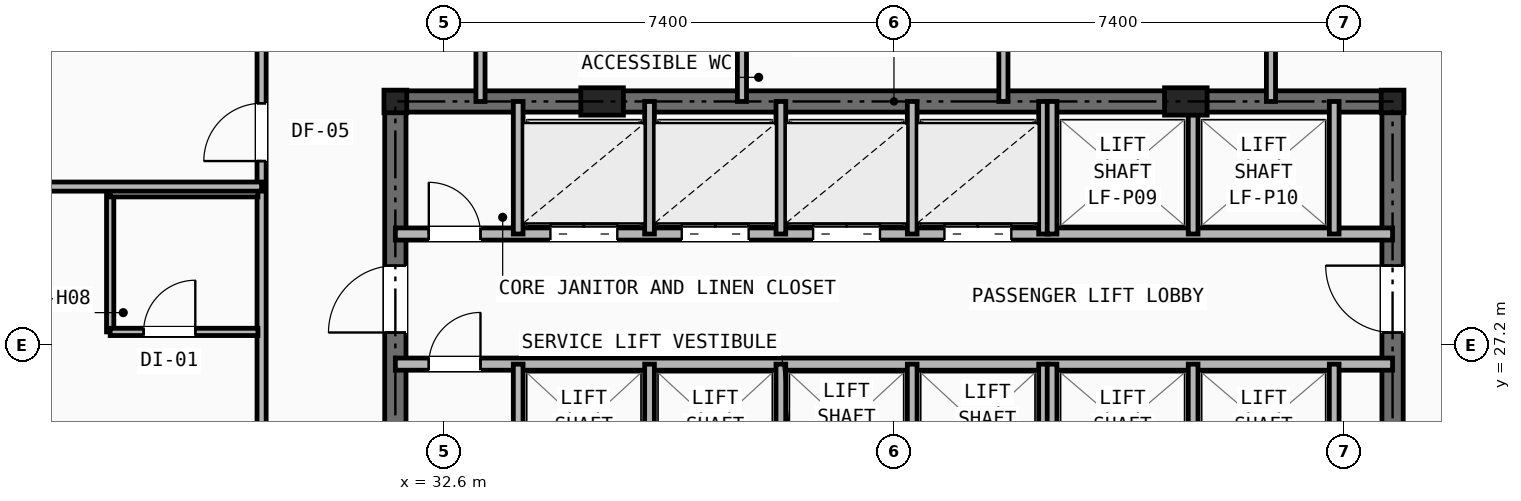
"""IFC4 building model, lengths in metres.
Left out: names, types, materials, properties, quantities, classifications, styles, units other than length and angle.
Written with IfcOpenShell. Run it as: python <this file> out.ifc"""

import sys

from ifc_helpers import new_model, si_unit, direction, frame, frame_2d, origin, origin_2d, place, context, subcontext, project, spatial, rectangle, i_section, extrude, element, fill, save


model = new_model("IFC4")
c1 = context("Model", 3, precision=1e-05, world=origin(), true_north=direction((0.0, 1.0)))
c2 = subcontext(c1, "Body", "Model", "MODEL_VIEW")
j1 = project(units=[si_unit("LENGTHUNIT", "METRE"), si_unit("PLANEANGLEUNIT", "RADIAN")], contexts=[c1])
p1 = place(None, origin())
s1 = spatial("IfcSite", under=j1, at=p1, CompositionType="ELEMENT")
p2 = place(p1, origin())
s2 = spatial("IfcBuilding", under=s1, at=p2, CompositionType="ELEMENT")
p3 = place(p2, frame((0.0, 0.0, 49.6)))
s3 = spatial("IfcBuildingStorey", under=s2, at=p3, CompositionType="ELEMENT", Elevation=49.6)
for number, where, z_axis, x_axis in (
    (1, (31.8, 31.2, 0.0), (0.0, 0.0, 1.0), (1.0, 0.0, 0.0)),
    (2, (48.2, 31.2, 0.0), (0.0, 0.0, 1.0), (1.0, 0.0, 0.0)),
):
    element("IfcColumn", number, at=place(p3, frame(where, z_axis=z_axis, x_axis=x_axis)), inside=s3, PredefinedType="COLUMN", context=c2, shape_type="SweptSolid", body=[
        extrude(i_section(OverallWidth=0.374, OverallDepth=0.372, WebThickness=0.016, FlangeThickness=0.026, at=origin_2d()), origin(), (0.0, 0.0, 1.0), 3.2),
    ])
for number, where, z_axis, x_axis in (
    (3, (35.2, 31.2, 0.0), (0.0, 0.0, 1.0), (1.0, 0.0, 0.0)),
    (4, (44.8, 31.2, 0.0), (0.0, 0.0, 1.0), (1.0, 0.0, 0.0)),
):
    element("IfcColumn", number, at=place(p3, frame(where, z_axis=z_axis, x_axis=x_axis)), inside=s3, PredefinedType="PILASTER", context=c2, shape_type="SweptSolid", body=[
        extrude(rectangle(XDim=0.7, YDim=0.45, at=origin_2d()), origin(), (0.0, 0.0, 1.0), 3.2),
    ])
p4 = place(p3, frame((31.8, 31.2, 0.0), z_axis=(0.0, 0.0, 1.0), x_axis=(1.0, 0.0, 0.0)))
e5 = element("IfcWall", 5, at=p4, inside=s3, PredefinedType="SHEAR", context=c2, shape_type="SweptSolid", body=[
    extrude(rectangle(XDim=16.4, YDim=0.35, at=frame_2d((8.2, 0.0))), origin(), (0.0, 0.0, 1.0), 2.98),
])
p5 = place(p3, frame((31.8, 16.4, 0.0), z_axis=(0.0, 0.0, 1.0), x_axis=(0.0, 1.0, 0.0)))
e6 = element("IfcWall", 6, at=p5, inside=s3, PredefinedType="SHEAR", context=c2, shape_type="SweptSolid", body=[
    extrude(rectangle(XDim=14.8, YDim=0.35, at=frame_2d((7.4, 0.0))), origin(), (0.0, 0.0, 1.0), 2.98),
])
p6 = place(p5, frame((11.0, 0.0, 0.0)))
e7 = element("IfcOpeningElement", 7, at=p6, cuts=e6, PredefinedType="OPENING", context=c2, shape_type="SweptSolid", body=[
    extrude(rectangle(XDim=1.1, YDim=2.15, at=frame_2d((0.55, 1.075))), frame((0.0, 0.185, 0.0), z_axis=(0.0, -1.0, 0.0), x_axis=(1.0, 0.0, 0.0)), (0.0, 0.0, 1.0), 0.37),
])
p7 = place(p3, frame((48.2, 16.4, 0.0), z_axis=(0.0, 0.0, 1.0), x_axis=(0.0, 1.0, 0.0)))
e8 = element("IfcWall", 8, at=p7, inside=s3, PredefinedType="SHEAR", context=c2, shape_type="SweptSolid", body=[
    extrude(rectangle(XDim=14.8, YDim=0.35, at=frame_2d((7.4, 0.0))), origin(), (0.0, 0.0, 1.0), 2.98),
])
p8 = place(p7, frame((11.0, 0.0, 0.0)))
e9 = element("IfcOpeningElement", 9, at=p8, cuts=e8, PredefinedType="OPENING", context=c2, shape_type="SweptSolid", body=[
    extrude(rectangle(XDim=1.1, YDim=2.15, at=frame_2d((0.55, 1.075))), frame((0.0, 0.185, 0.0), z_axis=(0.0, -1.0, 0.0), x_axis=(1.0, 0.0, 0.0)), (0.0, 0.0, 1.0), 0.37),
])
p9 = place(p3, frame((31.8, 29.02, 0.0), z_axis=(0.0, 0.0, 1.0), x_axis=(1.0, 0.0, 0.0)))
e10 = element("IfcWall", 10, at=p9, inside=s3, PredefinedType="SOLIDWALL", context=c2, shape_type="SweptSolid", body=[
    extrude(rectangle(XDim=16.4, YDim=0.2, at=frame_2d((8.2, 0.0))), origin(), (0.0, 0.0, 1.0), 2.431),
])
p10 = place(p9, frame((0.55, 0.0, 0.0)))
e11 = element("IfcOpeningElement", 11, at=p10, cuts=e10, PredefinedType="OPENING", context=c2, shape_type="SweptSolid", body=[
    extrude(rectangle(XDim=0.85, YDim=2.05, at=frame_2d((0.425, 1.025))), frame((0.0, 0.11, 0.0), z_axis=(0.0, -1.0, 0.0), x_axis=(1.0, 0.0, 0.0)), (0.0, 0.0, 1.0), 0.22),
])
p11 = place(p9, frame((2.55, 0.0, 0.0)))
e12 = element("IfcOpeningElement", 12, at=p11, cuts=e10, PredefinedType="OPENING", context=c2, shape_type="SweptSolid", body=[
    extrude(rectangle(XDim=1.1, YDim=2.15, at=frame_2d((0.55, 1.075))), frame((0.0, 0.11, 0.0), z_axis=(0.0, -1.0, 0.0), x_axis=(1.0, 0.0, 0.0)), (0.0, 0.0, 1.0), 0.22),
])
p12 = place(p9, frame((4.71, 0.0, 0.0)))
e13 = element("IfcOpeningElement", 13, at=p12, cuts=e10, PredefinedType="OPENING", context=c2, shape_type="SweptSolid", body=[
    extrude(rectangle(XDim=1.1, YDim=2.15, at=frame_2d((0.55, 1.075))), frame((0.0, 0.11, 0.0), z_axis=(0.0, -1.0, 0.0), x_axis=(1.0, 0.0, 0.0)), (0.0, 0.0, 1.0), 0.22),
])
p13 = place(p9, frame((6.87, 0.0, 0.0)))
e14 = element("IfcOpeningElement", 14, at=p13, cuts=e10, PredefinedType="OPENING", context=c2, shape_type="SweptSolid", body=[
    extrude(rectangle(XDim=1.1, YDim=2.15, at=frame_2d((0.55, 1.075))), frame((0.0, 0.11, 0.0), z_axis=(0.0, -1.0, 0.0), x_axis=(1.0, 0.0, 0.0)), (0.0, 0.0, 1.0), 0.22),
])
p14 = place(p9, frame((9.03, 0.0, 0.0)))
e15 = element("IfcOpeningElement", 15, at=p14, cuts=e10, PredefinedType="OPENING", context=c2, shape_type="SweptSolid", body=[
    extrude(rectangle(XDim=1.1, YDim=2.15, at=frame_2d((0.55, 1.075))), frame((0.0, 0.11, 0.0), z_axis=(0.0, -1.0, 0.0), x_axis=(1.0, 0.0, 0.0)), (0.0, 0.0, 1.0), 0.22),
])
p15 = place(p3, frame((31.8, 26.88, 0.0), z_axis=(0.0, 0.0, 1.0), x_axis=(1.0, 0.0, 0.0)))
e16 = element("IfcWall", 16, at=p15, inside=s3, PredefinedType="SOLIDWALL", context=c2, shape_type="SweptSolid", body=[
    extrude(rectangle(XDim=16.4, YDim=0.2, at=frame_2d((8.2, 0.0))), origin(), (0.0, 0.0, 1.0), 2.431),
])
p16 = place(p15, frame((0.55, 0.0, 0.0)))
e17 = element("IfcOpeningElement", 17, at=p16, cuts=e16, PredefinedType="OPENING", context=c2, shape_type="SweptSolid", body=[
    extrude(rectangle(XDim=0.85, YDim=2.05, at=frame_2d((0.425, 1.025))), frame((0.0, 0.11, 0.0), z_axis=(0.0, -1.0, 0.0), x_axis=(1.0, 0.0, 0.0)), (0.0, 0.0, 1.0), 0.22),
])
p17 = place(p3, frame((33.82, 29.02, 0.0), z_axis=(0.0, 0.0, 1.0), x_axis=(0.0, 1.0, 0.0)))
e18 = element("IfcWall", 18, at=p17, inside=s3, PredefinedType="SOLIDWALL", context=c2, shape_type="SweptSolid", body=[
    extrude(rectangle(XDim=2.18, YDim=0.16, at=frame_2d((1.09, 0.0))), origin(), (0.0, 0.0, 1.0), 2.431),
])
p18 = place(p3, frame((33.82, 24.8, 0.0), z_axis=(0.0, 0.0, 1.0), x_axis=(0.0, 1.0, 0.0)))
e19 = element("IfcWall", 19, at=p18, inside=s3, PredefinedType="SOLIDWALL", context=c2, shape_type="SweptSolid", body=[
    extrude(rectangle(XDim=2.08, YDim=0.16, at=frame_2d((1.04, 0.0))), origin(), (0.0, 0.0, 1.0), 2.98),
])
for number, where, z_axis, x_axis in (
    (20, (35.98, 29.02, 0.0), (0.0, 0.0, 1.0), (0.0, 1.0, 0.0)),
    (21, (38.14, 29.02, 0.0), (0.0, 0.0, 1.0), (0.0, 1.0, 0.0)),
    (22, (40.3, 29.02, 0.0), (0.0, 0.0, 1.0), (0.0, 1.0, 0.0)),
    (23, (42.46, 29.02, 0.0), (0.0, 0.0, 1.0), (0.0, 1.0, 0.0)),
):
    element("IfcWall", number, at=place(p3, frame(where, z_axis=z_axis, x_axis=x_axis)), inside=s3, PredefinedType="SOLIDWALL", context=c2, shape_type="SweptSolid", body=[
        extrude(rectangle(XDim=2.18, YDim=0.16, at=frame_2d((1.09, 0.0))), origin(), (0.0, 0.0, 1.0), 2.431),
    ])
for number, where, z_axis, x_axis in (
    (24, (35.98, 24.8, 0.0), (0.0, 0.0, 1.0), (0.0, 1.0, 0.0)),
    (25, (38.14, 24.8, 0.0), (0.0, 0.0, 1.0), (0.0, 1.0, 0.0)),
    (26, (40.3, 24.8, 0.0), (0.0, 0.0, 1.0), (0.0, 1.0, 0.0)),
    (27, (42.46, 24.8, 0.0), (0.0, 0.0, 1.0), (0.0, 1.0, 0.0)),
):
    element("IfcWall", number, at=place(p3, frame(where, z_axis=z_axis, x_axis=x_axis)), inside=s3, PredefinedType="SOLIDWALL", context=c2, shape_type="SweptSolid", body=[
        extrude(rectangle(XDim=2.08, YDim=0.16, at=frame_2d((1.04, 0.0))), origin(), (0.0, 0.0, 1.0), 2.98),
    ])
for number, where, z_axis, x_axis in (
    (28, (42.6, 29.02, 0.0), (0.0, 0.0, 1.0), (0.0, 1.0, 0.0)),
    (29, (44.92, 29.02, 0.0), (0.0, 0.0, 1.0), (0.0, 1.0, 0.0)),
    (30, (47.24, 29.02, 0.0), (0.0, 0.0, 1.0), (0.0, 1.0, 0.0)),
):
    element("IfcWall", number, at=place(p3, frame(where, z_axis=z_axis, x_axis=x_axis)), inside=s3, PredefinedType="SOLIDWALL", context=c2, shape_type="SweptSolid", body=[
        extrude(rectangle(XDim=2.18, YDim=0.16, at=frame_2d((1.09, 0.0))), origin(), (0.0, 0.0, 1.0), 2.431),
    ])
for number, where, z_axis, x_axis in (
    (31, (42.6, 24.8, 0.0), (0.0, 0.0, 1.0), (0.0, 1.0, 0.0)),
    (32, (44.92, 24.8, 0.0), (0.0, 0.0, 1.0), (0.0, 1.0, 0.0)),
    (33, (47.24, 24.8, 0.0), (0.0, 0.0, 1.0), (0.0, 1.0, 0.0)),
):
    element("IfcWall", number, at=place(p3, frame(where, z_axis=z_axis, x_axis=x_axis)), inside=s3, PredefinedType="SOLIDWALL", context=c2, shape_type="SweptSolid", body=[
        extrude(rectangle(XDim=2.08, YDim=0.16, at=frame_2d((1.04, 0.0))), origin(), (0.0, 0.0, 1.0), 2.98),
    ])
for number, where, z_axis, x_axis in (
    (34, (33.2, 31.2, 0.0), (0.0, 0.0, 1.0), (0.0, 1.0, 0.0)),
    (35, (46.2, 31.2, 0.0), (0.0, 0.0, 1.0), (0.0, 1.0, 0.0)),
    (36, (37.5, 31.2, 0.0), (0.0, 0.0, 1.0), (0.0, 1.0, 0.0)),
    (37, (41.8, 31.2, 0.0), (0.0, 0.0, 1.0), (0.0, 1.0, 0.0)),
):
    element("IfcWall", number, at=place(p3, frame(where, z_axis=z_axis, x_axis=x_axis)), inside=s3, PredefinedType="PARTITIONING", context=c2, shape_type="SweptSolid", body=[
        extrude(rectangle(XDim=2.6, YDim=0.15, at=frame_2d((1.3, 0.0))), origin(), (0.0, 0.0, 1.0), 2.431),
    ])
p19 = place(p3, frame((29.6, 14.1, 0.0), z_axis=(0.0, 0.0, 1.0), x_axis=(0.0, 1.0, 0.0)))
e38 = element("IfcWall", 38, at=p19, inside=s3, PredefinedType="PARTITIONING", context=c2, shape_type="SweptSolid", body=[
    extrude(rectangle(XDim=21.9, YDim=0.15, at=frame_2d((10.95, 0.0))), origin(), (0.0, 0.0, 1.0), 2.431),
])
p20 = place(p19, frame((0.42, 0.0, 0.0)))
e39 = element("IfcOpeningElement", 39, at=p20, cuts=e38, PredefinedType="OPENING", context=c2, shape_type="SweptSolid", body=[
    extrude(rectangle(XDim=0.95, YDim=2.1, at=frame_2d((0.475, 1.05))), frame((0.0, 0.085, 0.0), z_axis=(0.0, -1.0, 0.0), x_axis=(1.0, 0.0, 0.0)), (0.0, 0.0, 1.0), 0.17),
])
p21 = place(p19, frame((5.12, 0.0, 0.0)))
e40 = element("IfcOpeningElement", 40, at=p21, cuts=e38, PredefinedType="OPENING", context=c2, shape_type="SweptSolid", body=[
    extrude(rectangle(XDim=0.95, YDim=2.1, at=frame_2d((0.475, 1.05))), frame((0.0, 0.085, 0.0), z_axis=(0.0, -1.0, 0.0), x_axis=(1.0, 0.0, 0.0)), (0.0, 0.0, 1.0), 0.17),
])
p22 = place(p19, frame((10.12, 0.0, 0.0)))
e41 = element("IfcOpeningElement", 41, at=p22, cuts=e38, PredefinedType="OPENING", context=c2, shape_type="SweptSolid", body=[
    extrude(rectangle(XDim=0.95, YDim=2.1, at=frame_2d((0.475, 1.05))), frame((0.0, 0.085, 0.0), z_axis=(0.0, -1.0, 0.0), x_axis=(1.0, 0.0, 0.0)), (0.0, 0.0, 1.0), 0.17),
])
p23 = place(p19, frame((16.12, 0.0, 0.0)))
e42 = element("IfcOpeningElement", 42, at=p23, cuts=e38, PredefinedType="OPENING", context=c2, shape_type="SweptSolid", body=[
    extrude(rectangle(XDim=0.95, YDim=2.1, at=frame_2d((0.475, 1.05))), frame((0.0, 0.085, 0.0), z_axis=(0.0, -1.0, 0.0), x_axis=(1.0, 0.0, 0.0)), (0.0, 0.0, 1.0), 0.17),
])
p24 = place(p3, frame((27.11, 27.41, 0.0), z_axis=(0.0, 0.0, 1.0), x_axis=(0.0, 1.0, 0.0)))
e43 = element("IfcWall", 43, at=p24, inside=s3, PredefinedType="PARTITIONING", context=c2, shape_type="SweptSolid", body=[
    extrude(rectangle(XDim=2.28, YDim=0.12, at=frame_2d((1.14, 0.0))), origin(), (0.0, 0.0, 1.0), 2.98),
])
p25 = place(p3, frame((27.11, 27.41, 0.0), z_axis=(0.0, 0.0, 1.0), x_axis=(1.0, 0.0, 0.0)))
e44 = element("IfcWall", 44, at=p25, inside=s3, PredefinedType="PARTITIONING", context=c2, shape_type="SweptSolid", body=[
    extrude(rectangle(XDim=2.43, YDim=0.12, at=frame_2d((1.215, 0.0))), origin(), (0.0, 0.0, 1.0), 2.98),
])
p26 = place(p25, frame((0.55, 0.0, 0.0)))
e45 = element("IfcOpeningElement", 45, at=p26, cuts=e44, PredefinedType="OPENING", context=c2, shape_type="SweptSolid", body=[
    extrude(rectangle(XDim=0.85, YDim=2.05, at=frame_2d((0.425, 1.025))), frame((0.0, 0.07, 0.0), z_axis=(0.0, -1.0, 0.0), x_axis=(1.0, 0.0, 0.0)), (0.0, 0.0, 1.0), 0.14),
])
p27 = place(p3, frame((27.11, 29.69, 0.0), z_axis=(0.0, 0.0, 1.0), x_axis=(1.0, 0.0, 0.0)))
e46 = element("IfcWall", 46, at=p27, inside=s3, PredefinedType="PARTITIONING", context=c2, shape_type="SweptSolid", body=[
    extrude(rectangle(XDim=2.43, YDim=0.12, at=frame_2d((1.215, 0.0))), origin(), (0.0, 0.0, 1.0), 2.98),
])
p28 = place(p3, frame((19.333, 29.8, 0.0), z_axis=(0.0, 0.0, 1.0), x_axis=(1.0, 0.0, 0.0)))
e47 = element("IfcWall", 47, at=p28, inside=s3, PredefinedType="PARTITIONING", context=c2, shape_type="SweptSolid", body=[
    extrude(rectangle(XDim=10.267, YDim=0.15, at=frame_2d((5.133, 0.0))), origin(), (0.0, 0.0, 1.0), 2.268),
])
p29 = place(p10, origin())
e48 = element("IfcDoor", 48, at=p29, inside=s3, OperationType="SINGLE_SWING_LEFT", PredefinedType="DOOR", context=c2, shape_type="SweptSolid", body=[
    extrude(rectangle(XDim=0.85, YDim=2.05, at=frame_2d((0.425, 1.025))), frame((0.0, 0.025, 0.0), z_axis=(0.0, -1.0, 0.0), x_axis=(1.0, 0.0, 0.0)), (0.0, 0.0, 1.0), 0.05),
])
fill(e11, e48)
p30 = place(p16, origin())
e49 = element("IfcDoor", 49, at=p30, inside=s3, OperationType="SINGLE_SWING_RIGHT", PredefinedType="DOOR", context=c2, shape_type="SweptSolid", body=[
    extrude(rectangle(XDim=0.85, YDim=2.05, at=frame_2d((0.425, 1.025))), frame((0.0, 0.025, 0.0), z_axis=(0.0, -1.0, 0.0), x_axis=(1.0, 0.0, 0.0)), (0.0, 0.0, 1.0), 0.05),
])
fill(e17, e49)
p31 = place(p6, origin())
e50 = element("IfcDoor", 50, at=p31, inside=s3, OperationType="SINGLE_SWING_LEFT", PredefinedType="DOOR", context=c2, shape_type="SweptSolid", body=[
    extrude(rectangle(XDim=1.1, YDim=2.15, at=frame_2d((0.55, 1.075))), frame((0.0, 0.025, 0.0), z_axis=(0.0, -1.0, 0.0), x_axis=(1.0, 0.0, 0.0)), (0.0, 0.0, 1.0), 0.05),
])
fill(e7, e50)
p32 = place(p8, origin())
e51 = element("IfcDoor", 51, at=p32, inside=s3, OperationType="SINGLE_SWING_RIGHT", PredefinedType="DOOR", context=c2, shape_type="SweptSolid", body=[
    extrude(rectangle(XDim=1.1, YDim=2.15, at=frame_2d((0.55, 1.075))), frame((0.0, 0.025, 0.0), z_axis=(0.0, -1.0, 0.0), x_axis=(1.0, 0.0, 0.0)), (0.0, 0.0, 1.0), 0.05),
])
fill(e9, e51)
p33 = place(p11, origin())
e52 = element("IfcDoor", 52, at=p33, inside=s3, OperationType="DOUBLE_DOOR_SLIDING", PredefinedType="DOOR", context=c2, shape_type="SweptSolid", body=[
    extrude(rectangle(XDim=1.1, YDim=2.15, at=frame_2d((0.55, 1.075))), frame((0.0, 0.025, 0.0), z_axis=(0.0, -1.0, 0.0), x_axis=(1.0, 0.0, 0.0)), (0.0, 0.0, 1.0), 0.05),
])
fill(e12, e52)
p34 = place(p12, origin())
e53 = element("IfcDoor", 53, at=p34, inside=s3, OperationType="DOUBLE_DOOR_SLIDING", PredefinedType="DOOR", context=c2, shape_type="SweptSolid", body=[
    extrude(rectangle(XDim=1.1, YDim=2.15, at=frame_2d((0.55, 1.075))), frame((0.0, 0.025, 0.0), z_axis=(0.0, -1.0, 0.0), x_axis=(1.0, 0.0, 0.0)), (0.0, 0.0, 1.0), 0.05),
])
fill(e13, e53)
p35 = place(p13, origin())
e54 = element("IfcDoor", 54, at=p35, inside=s3, OperationType="DOUBLE_DOOR_SLIDING", PredefinedType="DOOR", context=c2, shape_type="SweptSolid", body=[
    extrude(rectangle(XDim=1.1, YDim=2.15, at=frame_2d((0.55, 1.075))), frame((0.0, 0.025, 0.0), z_axis=(0.0, -1.0, 0.0), x_axis=(1.0, 0.0, 0.0)), (0.0, 0.0, 1.0), 0.05),
])
fill(e14, e54)
p36 = place(p14, origin())
e55 = element("IfcDoor", 55, at=p36, inside=s3, OperationType="DOUBLE_DOOR_SLIDING", PredefinedType="DOOR", context=c2, shape_type="SweptSolid", body=[
    extrude(rectangle(XDim=1.1, YDim=2.15, at=frame_2d((0.55, 1.075))), frame((0.0, 0.025, 0.0), z_axis=(0.0, -1.0, 0.0), x_axis=(1.0, 0.0, 0.0)), (0.0, 0.0, 1.0), 0.05),
])
fill(e15, e55)
p37 = place(p26, origin())
e56 = element("IfcDoor", 56, at=p37, inside=s3, OperationType="SINGLE_SWING_RIGHT", PredefinedType="DOOR", context=c2, shape_type="SweptSolid", body=[
    extrude(rectangle(XDim=0.85, YDim=2.05, at=frame_2d((0.425, 1.025))), frame((0.0, 0.025, 0.0), z_axis=(0.0, -1.0, 0.0), x_axis=(1.0, 0.0, 0.0)), (0.0, 0.0, 1.0), 0.05),
])
fill(e45, e56)
p38 = place(p23, origin())
e57 = element("IfcDoor", 57, at=p38, inside=s3, OperationType="SINGLE_SWING_LEFT", PredefinedType="DOOR", context=c2, shape_type="SweptSolid", body=[
    extrude(rectangle(XDim=0.95, YDim=2.1, at=frame_2d((0.475, 1.05))), frame((0.0, 0.025, 0.0), z_axis=(0.0, -1.0, 0.0), x_axis=(1.0, 0.0, 0.0)), (0.0, 0.0, 1.0), 0.05),
])
fill(e42, e57)
save(model, sys.argv[1])
